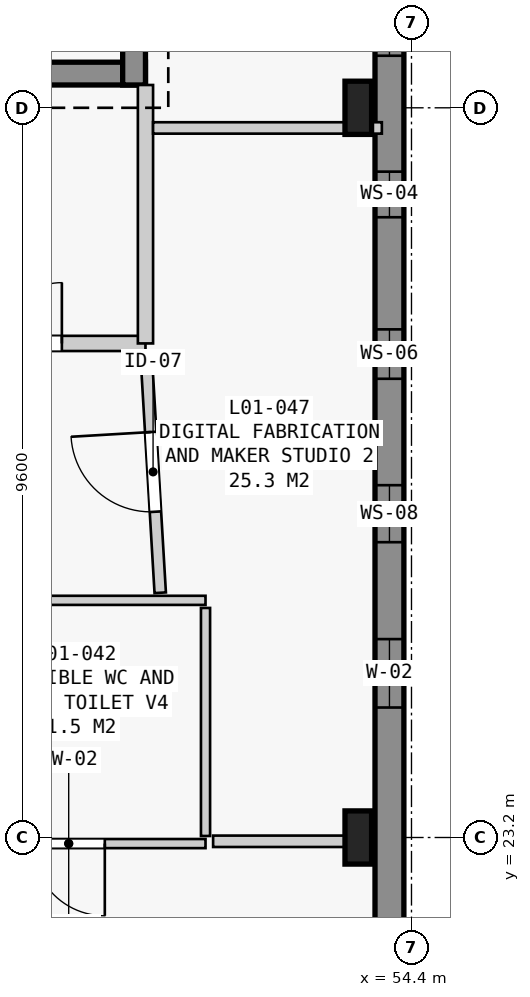
"""IFC4 building model, lengths in metres.
Left out: names, types, materials, properties, quantities, classifications, styles, units other than length and angle.
Written with IfcOpenShell. Run it as: python <this file> out.ifc"""

import sys

from ifc_helpers import new_model, si_unit, direction, frame, frame_2d, origin, origin_2d, place, context, subcontext, project, spatial, rectangle, extrude, element, fill, save


model = new_model("IFC4")
c1 = context("Model", 3, precision=1e-05, world=origin(), true_north=direction((0.0, 1.0)))
c2 = subcontext(c1, "Body", "Model", "MODEL_VIEW")
j1 = project(units=[si_unit("LENGTHUNIT", "METRE"), si_unit("PLANEANGLEUNIT", "RADIAN")], contexts=[c1])
p1 = place(None, origin())
s1 = spatial("IfcSite", under=j1, at=p1, CompositionType="ELEMENT")
p2 = place(p1, origin())
s2 = spatial("IfcBuilding", under=s1, at=p2, CompositionType="ELEMENT")
p3 = place(p2, frame((0.0, 0.0, 5.4)))
s3 = spatial("IfcBuildingStorey", under=s2, at=p3, CompositionType="ELEMENT", Elevation=5.4)
for number, where, z_axis, x_axis in (
    (1, (53.7, 23.2, 0.0), (0.0, 0.0, 1.0), (1.0, 0.0, 0.0)),
    (2, (53.7, 32.8, 0.0), (0.0, 0.0, 1.0), (1.0, 0.0, 0.0)),
):
    element("IfcColumn", number, at=place(p3, frame(where, z_axis=z_axis, x_axis=x_axis)), inside=s3, PredefinedType="COLUMN", context=c2, shape_type="SweptSolid", body=[
        extrude(rectangle(XDim=0.35, YDim=0.7, at=origin_2d()), origin(), (0.0, 0.0, 1.0), 4.2),
    ])
p4 = place(p3, frame((54.11, 42.11, 0.0), z_axis=(0.0, 0.0, 1.0), x_axis=(0.0, -1.0, 0.0)))
e3 = element("IfcWall", 3, at=p4, inside=s3, PredefinedType="STANDARD", context=c2, shape_type="SweptSolid", body=[
    extrude(rectangle(XDim=37.92, YDim=0.38, at=frame_2d((18.96, 0.0))), origin(), (0.0, 0.0, 1.0), 3.94),
])
p5 = place(p4, frame((1.45, 0.0, 0.95)))
e4 = element("IfcOpeningElement", 4, at=p5, cuts=e3, PredefinedType="OPENING", context=c2, shape_type="SweptSolid", body=[
    extrude(rectangle(XDim=1.2, YDim=2.4, at=frame_2d((0.6, 1.2))), frame((0.0, 0.2, 0.0), z_axis=(0.0, -1.0, 0.0), x_axis=(1.0, 0.0, 0.0)), (0.0, 0.0, 1.0), 0.4),
])
p6 = place(p4, frame((3.475, 0.0, 0.95)))
e5 = element("IfcOpeningElement", 5, at=p6, cuts=e3, PredefinedType="OPENING", context=c2, shape_type="SweptSolid", body=[
    extrude(rectangle(XDim=1.35, YDim=2.5, at=frame_2d((0.675, 1.25))), frame((0.0, 0.2, 0.0), z_axis=(0.0, -1.0, 0.0), x_axis=(1.0, 0.0, 0.0)), (0.0, 0.0, 1.0), 0.4),
])
p7 = place(p4, frame((5.5, 0.0, 0.95)))
e6 = element("IfcOpeningElement", 6, at=p7, cuts=e3, PredefinedType="OPENING", context=c2, shape_type="SweptSolid", body=[
    extrude(rectangle(XDim=1.5, YDim=2.2, at=frame_2d((0.75, 1.1))), frame((0.0, 0.2, 0.0), z_axis=(0.0, -1.0, 0.0), x_axis=(1.0, 0.0, 0.0)), (0.0, 0.0, 1.0), 0.4),
])
p8 = place(p4, frame((8.075, 0.0, 0.95)))
e7 = element("IfcOpeningElement", 7, at=p8, cuts=e3, PredefinedType="OPENING", context=c2, shape_type="SweptSolid", body=[
    extrude(rectangle(XDim=0.55, YDim=2.1, at=frame_2d((0.275, 1.05))), frame((0.0, 0.2, 0.0), z_axis=(0.0, -1.0, 0.0), x_axis=(1.0, 0.0, 0.0)), (0.0, 0.0, 1.0), 0.4),
])
p9 = place(p4, frame((10.15, 0.0, 0.95)))
e8 = element("IfcOpeningElement", 8, at=p9, cuts=e3, PredefinedType="OPENING", context=c2, shape_type="SweptSolid", body=[
    extrude(rectangle(XDim=0.6, YDim=2.2, at=frame_2d((0.3, 1.1))), frame((0.0, 0.2, 0.0), z_axis=(0.0, -1.0, 0.0), x_axis=(1.0, 0.0, 0.0)), (0.0, 0.0, 1.0), 0.4),
])
p10 = place(p4, frame((12.225, 0.0, 0.95)))
e9 = element("IfcOpeningElement", 9, at=p10, cuts=e3, PredefinedType="OPENING", context=c2, shape_type="SweptSolid", body=[
    extrude(rectangle(XDim=0.65, YDim=2.4, at=frame_2d((0.325, 1.2))), frame((0.0, 0.2, 0.0), z_axis=(0.0, -1.0, 0.0), x_axis=(1.0, 0.0, 0.0)), (0.0, 0.0, 1.0), 0.4),
])
p11 = place(p4, frame((14.275, 0.0, 0.95)))
e10 = element("IfcOpeningElement", 10, at=p11, cuts=e3, PredefinedType="OPENING", context=c2, shape_type="SweptSolid", body=[
    extrude(rectangle(XDim=0.75, YDim=2.3, at=frame_2d((0.375, 1.15))), frame((0.0, 0.2, 0.0), z_axis=(0.0, -1.0, 0.0), x_axis=(1.0, 0.0, 0.0)), (0.0, 0.0, 1.0), 0.4),
])
p12 = place(p4, frame((16.3, 0.0, 0.95)))
e11 = element("IfcOpeningElement", 11, at=p12, cuts=e3, PredefinedType="OPENING", context=c2, shape_type="SweptSolid", body=[
    extrude(rectangle(XDim=0.9, YDim=2.2, at=frame_2d((0.45, 1.1))), frame((0.0, 0.2, 0.0), z_axis=(0.0, -1.0, 0.0), x_axis=(1.0, 0.0, 0.0)), (0.0, 0.0, 1.0), 0.4),
])
p13 = place(p4, frame((20.35, 0.0, 0.95)))
e12 = element("IfcOpeningElement", 12, at=p13, cuts=e3, PredefinedType="OPENING", context=c2, shape_type="SweptSolid", body=[
    extrude(rectangle(XDim=1.2, YDim=1.8, at=frame_2d((0.6, 0.9))), frame((0.0, 0.2, 0.0), z_axis=(0.0, -1.0, 0.0), x_axis=(1.0, 0.0, 0.0)), (0.0, 0.0, 1.0), 0.4),
])
p14 = place(p4, frame((22.45, 0.0, 0.95)))
e13 = element("IfcOpeningElement", 13, at=p14, cuts=e3, PredefinedType="OPENING", context=c2, shape_type="SweptSolid", body=[
    extrude(rectangle(XDim=1.2, YDim=2.4, at=frame_2d((0.6, 1.2))), frame((0.0, 0.2, 0.0), z_axis=(0.0, -1.0, 0.0), x_axis=(1.0, 0.0, 0.0)), (0.0, 0.0, 1.0), 0.4),
])
p15 = place(p4, frame((24.475, 0.0, 0.95)))
e14 = element("IfcOpeningElement", 14, at=p15, cuts=e3, PredefinedType="OPENING", context=c2, shape_type="SweptSolid", body=[
    extrude(rectangle(XDim=1.35, YDim=2.5, at=frame_2d((0.675, 1.25))), frame((0.0, 0.2, 0.0), z_axis=(0.0, -1.0, 0.0), x_axis=(1.0, 0.0, 0.0)), (0.0, 0.0, 1.0), 0.4),
])
p16 = place(p4, frame((29.075, 0.0, 0.95)))
e15 = element("IfcOpeningElement", 15, at=p16, cuts=e3, PredefinedType="OPENING", context=c2, shape_type="SweptSolid", body=[
    extrude(rectangle(XDim=0.55, YDim=1.8, at=frame_2d((0.275, 0.9))), frame((0.0, 0.2, 0.0), z_axis=(0.0, -1.0, 0.0), x_axis=(1.0, 0.0, 0.0)), (0.0, 0.0, 1.0), 0.4),
])
p17 = place(p4, frame((31.15, 0.0, 0.95)))
e16 = element("IfcOpeningElement", 16, at=p17, cuts=e3, PredefinedType="OPENING", context=c2, shape_type="SweptSolid", body=[
    extrude(rectangle(XDim=0.6, YDim=1.9, at=frame_2d((0.3, 0.95))), frame((0.0, 0.2, 0.0), z_axis=(0.0, -1.0, 0.0), x_axis=(1.0, 0.0, 0.0)), (0.0, 0.0, 1.0), 0.4),
])
p18 = place(p4, frame((33.225, 0.0, 0.95)))
e17 = element("IfcOpeningElement", 17, at=p18, cuts=e3, PredefinedType="OPENING", context=c2, shape_type="SweptSolid", body=[
    extrude(rectangle(XDim=0.65, YDim=2.0, at=frame_2d((0.325, 1.0))), frame((0.0, 0.2, 0.0), z_axis=(0.0, -1.0, 0.0), x_axis=(1.0, 0.0, 0.0)), (0.0, 0.0, 1.0), 0.4),
])
p19 = place(p4, frame((35.3, 0.0, 0.95)))
e18 = element("IfcOpeningElement", 18, at=p19, cuts=e3, PredefinedType="OPENING", context=c2, shape_type="SweptSolid", body=[
    extrude(rectangle(XDim=0.7, YDim=2.1, at=frame_2d((0.35, 1.05))), frame((0.0, 0.2, 0.0), z_axis=(0.0, -1.0, 0.0), x_axis=(1.0, 0.0, 0.0)), (0.0, 0.0, 1.0), 0.4),
])
p20 = place(p3, frame((50.9, 33.25, 0.0), z_axis=(0.0, 0.0, 1.0), x_axis=(-1.0, 0.0, 0.0)))
e19 = element("IfcWall", 19, at=p20, inside=s3, PredefinedType="SHEAR", context=c2, shape_type="SweptSolid", body=[
    extrude(rectangle(XDim=3.8, YDim=0.3, at=frame_2d((1.9, 0.0))), origin(), (0.0, 0.0, 1.0), 3.94),
])
p21 = place(p20, frame((1.25, 0.0, 0.0)))
e20 = element("IfcOpeningElement", 20, at=p21, cuts=e19, PredefinedType="OPENING", context=c2, shape_type="SweptSolid", body=[
    extrude(rectangle(XDim=1.3, YDim=2.2, at=frame_2d((0.65, 1.1))), frame((0.0, 0.16, 0.0), z_axis=(0.0, -1.0, 0.0), x_axis=(1.0, 0.0, 0.0)), (0.0, 0.0, 1.0), 0.32),
])
p22 = place(p3, frame((50.75, 41.2, 0.0), z_axis=(0.0, 0.0, 1.0), x_axis=(0.0, -1.0, 0.0)))
e21 = element("IfcWall", 21, at=p22, inside=s3, PredefinedType="SHEAR", context=c2, shape_type="SweptSolid", body=[
    extrude(rectangle(XDim=8.1, YDim=0.3, at=frame_2d((4.05, 0.0))), origin(), (0.0, 0.0, 1.0), 3.94),
])
p23 = place(p3, frame((47.1, 29.7, 0.0), z_axis=(0.0, 0.0, 1.0), x_axis=(1.0, 0.0, 0.0)))
e22 = element("IfcWall", 22, at=p23, inside=s3, PredefinedType="STANDARD", context=c2, shape_type="SweptSolid", body=[
    extrude(rectangle(XDim=3.8, YDim=0.2, at=frame_2d((1.9, 0.0))), origin(), (0.0, 0.0, 1.0), 3.94),
])
p24 = place(p23, frame((1.1, 0.0, 0.0)))
e23 = element("IfcOpeningElement", 23, at=p24, cuts=e22, PredefinedType="OPENING", context=c2, shape_type="SweptSolid", body=[
    extrude(rectangle(XDim=1.6, YDim=2.2, at=frame_2d((0.8, 1.1))), frame((0.0, 0.11, 0.0), z_axis=(0.0, -1.0, 0.0), x_axis=(1.0, 0.0, 0.0)), (0.0, 0.0, 1.0), 0.22),
])
p25 = place(p3, frame((50.9, 29.7, 0.0), z_axis=(0.0, 0.0, 1.0), x_axis=(0.0, 1.0, 0.0)))
e24 = element("IfcWall", 24, at=p25, inside=s3, PredefinedType="STANDARD", context=c2, shape_type="SweptSolid", body=[
    extrude(rectangle(XDim=3.4, YDim=0.2, at=frame_2d((1.7, 0.0))), origin(), (0.0, 0.0, 1.0), 3.22),
])
p26 = place(p3, frame((51.69, 23.12, 0.0), z_axis=(0.0, 0.0, 1.0), x_axis=(-1.0, 0.0, 0.0)))
e25 = element("IfcWall", 25, at=p26, inside=s3, PredefinedType="PARTITIONING", context=c2, shape_type="SweptSolid", body=[
    extrude(rectangle(XDim=3.6, YDim=0.12, at=frame_2d((1.8, 0.0))), origin(), (0.0, 0.0, 1.0), 3.12),
])
p27 = place(p26, frame((1.325, 0.0, 0.0)))
e26 = element("IfcOpeningElement", 26, at=p27, cuts=e25, PredefinedType="OPENING", context=c2, shape_type="SweptSolid", body=[
    extrude(rectangle(XDim=0.95, YDim=2.15, at=frame_2d((0.475, 1.075))), frame((0.0, 0.07, 0.0), z_axis=(0.0, -1.0, 0.0), x_axis=(1.0, 0.0, 0.0)), (0.0, 0.0, 1.0), 0.14),
])
p28 = place(p3, frame((48.19, 26.32, 0.0), z_axis=(0.0, 0.0, 1.0), x_axis=(1.0, 0.0, 0.0)))
e27 = element("IfcWall", 27, at=p28, inside=s3, PredefinedType="PARTITIONING", context=c2, shape_type="SweptSolid", body=[
    extrude(rectangle(XDim=3.5, YDim=0.12, at=frame_2d((1.75, 0.0))), origin(), (0.0, 0.0, 1.0), 3.94),
])
p29 = place(p3, frame((51.69, 26.22, 0.0), z_axis=(0.0, 0.0, 1.0), x_axis=(0.0, -1.0, 0.0)))
e28 = element("IfcWall", 28, at=p29, inside=s3, PredefinedType="PARTITIONING", context=c2, shape_type="SweptSolid", body=[
    extrude(rectangle(XDim=3.0, YDim=0.12, at=frame_2d((1.5, 0.0))), origin(), (0.0, 0.0, 1.0), 3.12),
])
p30 = place(p3, frame((51.094, 26.42, 0.0), z_axis=(0.0, 0.0, 1.0), x_axis=(-0.059009535749, 0.998257419051, 0.0)))
e29 = element("IfcWall", 29, at=p30, inside=s3, PredefinedType="PARTITIONING", context=c2, shape_type="SweptSolid", body=[
    extrude(rectangle(XDim=3.186, YDim=0.15, at=frame_2d((1.593, 0.0))), origin(), (0.0, 0.0, 1.0), 3.94),
])
p31 = place(p30, frame((1.068, 0.0, 0.0)))
e30 = element("IfcOpeningElement", 30, at=p31, cuts=e29, PredefinedType="OPENING", context=c2, shape_type="SweptSolid", body=[
    extrude(rectangle(XDim=1.05, YDim=2.2, at=frame_2d((0.525, 1.1))), frame((0.0, 0.085, 0.0), z_axis=(0.0, -1.0, 0.0), x_axis=(1.0, 0.0, 0.0)), (0.0, 0.0, 1.0), 0.17),
])
p32 = place(p3, frame((51.0, 32.535, 0.0), z_axis=(0.0, 0.0, 1.0), x_axis=(1.0, 0.0, 0.0)))
e31 = element("IfcWall", 31, at=p32, inside=s3, PredefinedType="PARTITIONING", context=c2, shape_type="SweptSolid", body=[
    extrude(rectangle(XDim=3.01, YDim=0.15, at=frame_2d((1.505, 0.0))), origin(), (0.0, 0.0, 1.0), 3.22),
])
p33 = place(p3, frame((53.92, 23.15, 0.0), z_axis=(0.0, 0.0, 1.0), x_axis=(-1.0, 0.0, 0.0)))
e32 = element("IfcWall", 32, at=p33, inside=s3, PredefinedType="PARTITIONING", context=c2, shape_type="SweptSolid", body=[
    extrude(rectangle(XDim=2.13, YDim=0.15, at=frame_2d((1.065, 0.0))), origin(), (0.0, 0.0, 1.0), 3.12),
])
p34 = place(p8, origin())
e33 = element("IfcWindow", 33, at=p34, inside=s3, PartitioningType="SINGLE_PANEL", PredefinedType="WINDOW", context=c2, shape_type="SweptSolid", body=[
    extrude(rectangle(XDim=0.55, YDim=2.1, at=frame_2d((0.275, 1.05))), frame((0.0, 0.03, 0.0), z_axis=(0.0, -1.0, 0.0), x_axis=(1.0, 0.0, 0.0)), (0.0, 0.0, 1.0), 0.06),
])
fill(e7, e33)
p35 = place(p9, origin())
e34 = element("IfcWindow", 34, at=p35, inside=s3, PartitioningType="SINGLE_PANEL", PredefinedType="WINDOW", context=c2, shape_type="SweptSolid", body=[
    extrude(rectangle(XDim=0.6, YDim=2.2, at=frame_2d((0.3, 1.1))), frame((0.0, 0.03, 0.0), z_axis=(0.0, -1.0, 0.0), x_axis=(1.0, 0.0, 0.0)), (0.0, 0.0, 1.0), 0.06),
])
fill(e8, e34)
p36 = place(p10, origin())
e35 = element("IfcWindow", 35, at=p36, inside=s3, PartitioningType="SINGLE_PANEL", PredefinedType="WINDOW", context=c2, shape_type="SweptSolid", body=[
    extrude(rectangle(XDim=0.65, YDim=2.4, at=frame_2d((0.325, 1.2))), frame((0.0, 0.03, 0.0), z_axis=(0.0, -1.0, 0.0), x_axis=(1.0, 0.0, 0.0)), (0.0, 0.0, 1.0), 0.06),
])
fill(e9, e35)
p37 = place(p11, origin())
e36 = element("IfcWindow", 36, at=p37, inside=s3, PartitioningType="SINGLE_PANEL", PredefinedType="WINDOW", context=c2, shape_type="SweptSolid", body=[
    extrude(rectangle(XDim=0.75, YDim=2.3, at=frame_2d((0.375, 1.15))), frame((0.0, 0.03, 0.0), z_axis=(0.0, -1.0, 0.0), x_axis=(1.0, 0.0, 0.0)), (0.0, 0.0, 1.0), 0.06),
])
fill(e10, e36)
p38 = place(p12, origin())
e37 = element("IfcWindow", 37, at=p38, inside=s3, PartitioningType="SINGLE_PANEL", PredefinedType="WINDOW", context=c2, shape_type="SweptSolid", body=[
    extrude(rectangle(XDim=0.9, YDim=2.2, at=frame_2d((0.45, 1.1))), frame((0.0, 0.03, 0.0), z_axis=(0.0, -1.0, 0.0), x_axis=(1.0, 0.0, 0.0)), (0.0, 0.0, 1.0), 0.06),
])
fill(e11, e37)
p39 = place(p24, origin())
e38 = element("IfcDoor", 38, at=p39, inside=s3, OperationType="DOUBLE_DOOR_SINGLE_SWING", PredefinedType="DOOR", context=c2, shape_type="SweptSolid", body=[
    extrude(rectangle(XDim=1.6, YDim=2.2, at=frame_2d((0.8, 1.1))), frame((0.0, 0.025, 0.0), z_axis=(0.0, -1.0, 0.0), x_axis=(1.0, 0.0, 0.0)), (0.0, 0.0, 1.0), 0.05),
])
fill(e23, e38)
p40 = place(p27, origin())
e39 = element("IfcDoor", 39, at=p40, inside=s3, OperationType="SINGLE_SWING_LEFT", PredefinedType="DOOR", context=c2, shape_type="SweptSolid", body=[
    extrude(rectangle(XDim=0.95, YDim=2.15, at=frame_2d((0.475, 1.075))), frame((0.0, 0.025, 0.0), z_axis=(0.0, -1.0, 0.0), x_axis=(1.0, 0.0, 0.0)), (0.0, 0.0, 1.0), 0.05),
])
fill(e26, e39)
p41 = place(p31, origin())
e40 = element("IfcDoor", 40, at=p41, inside=s3, OperationType="SINGLE_SWING_RIGHT", PredefinedType="DOOR", context=c2, shape_type="SweptSolid", body=[
    extrude(rectangle(XDim=1.05, YDim=2.2, at=frame_2d((0.525, 1.1))), frame((0.0, 0.025, 0.0), z_axis=(0.0, -1.0, 0.0), x_axis=(1.0, 0.0, 0.0)), (0.0, 0.0, 1.0), 0.05),
])
fill(e30, e40)
save(model, sys.argv[1])
